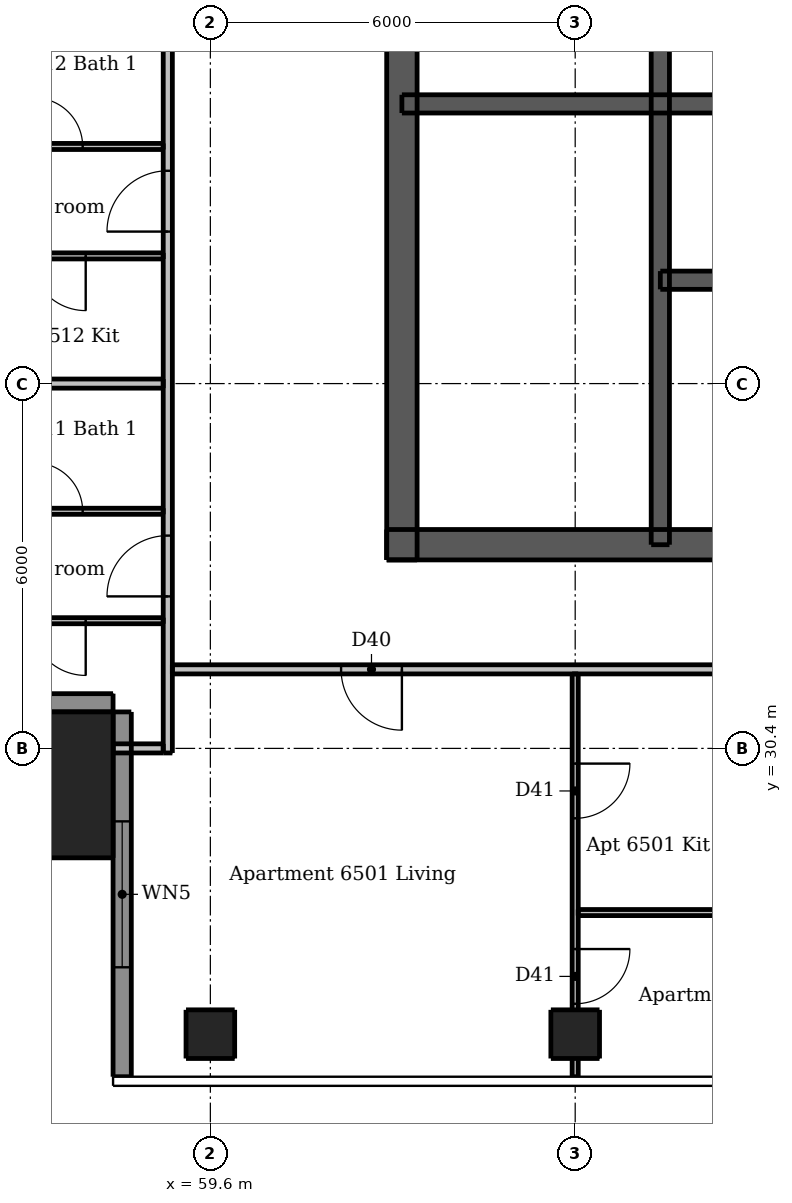
"""IFC4 building model, lengths in metres.
Left out: names, types, materials, properties, quantities, classifications, styles, units other than length and angle.
Written with IfcOpenShell. Run it as: python <this file> out.ifc"""

import sys

from ifc_helpers import new_model, si_unit, direction, frame, frame_2d, origin, origin_2d, place, context, subcontext, project, spatial, rectangle, extrude, element, fill, save


model = new_model("IFC4")
c1 = context("Model", 3, precision=1e-05, world=origin(), true_north=direction((0.0, 1.0)))
c2 = subcontext(c1, "Body", "Model", "MODEL_VIEW")
j1 = project(units=[si_unit("LENGTHUNIT", "METRE"), si_unit("PLANEANGLEUNIT", "RADIAN")], contexts=[c1])
p1 = place(None, origin())
s1 = spatial("IfcSite", under=j1, at=p1, CompositionType="ELEMENT")
p2 = place(p1, origin())
s2 = spatial("IfcBuilding", under=s1, at=p2, CompositionType="ELEMENT")
p3 = place(p2, frame((0.0, 0.0, 245.5)))
s3 = spatial("IfcBuildingStorey", under=s2, at=p3, CompositionType="ELEMENT", Elevation=245.5)
p4 = place(p3, frame((62.5, 33.75, 0.0), z_axis=(0.0, 0.0, 1.0), x_axis=(1.0, 0.0, 0.0)))
e1 = element("IfcWall", 1, at=p4, inside=s3, PredefinedType="SHEAR", context=c2, shape_type="SweptSolid", body=[
    extrude(rectangle(XDim=24.0, YDim=0.5, at=frame_2d((12.0, 0.0))), origin(), (0.0, 0.0, 1.0), 3.05),
])
p5 = place(p4, frame((1.875, 0.0, 0.0)))
e2 = element("IfcOpeningElement", 2, at=p5, cuts=e1, PredefinedType="OPENING", context=c2, shape_type="SweptSolid", body=[
    extrude(rectangle(XDim=1.1, YDim=2.1, at=frame_2d((0.55, 1.05))), frame((0.0, 0.26, 0.0), z_axis=(0.0, -1.0, 0.0), x_axis=(1.0, 0.0, 0.0)), (0.0, 0.0, 1.0), 0.52),
])
p6 = place(p4, frame((21.025, 0.0, 0.0)))
e3 = element("IfcOpeningElement", 3, at=p6, cuts=e1, PredefinedType="OPENING", context=c2, shape_type="SweptSolid", body=[
    extrude(rectangle(XDim=1.1, YDim=2.1, at=frame_2d((0.55, 1.05))), frame((0.0, 0.26, 0.0), z_axis=(0.0, -1.0, 0.0), x_axis=(1.0, 0.0, 0.0)), (0.0, 0.0, 1.0), 0.52),
])
p7 = place(p4, frame((8.0, 0.0, 0.0)))
e4 = element("IfcOpeningElement", 4, at=p7, cuts=e1, PredefinedType="OPENING", context=c2, shape_type="SweptSolid", body=[
    extrude(rectangle(XDim=1.1, YDim=2.1, at=frame_2d((0.55, 1.05))), frame((0.0, 0.26, 0.0), z_axis=(0.0, -1.0, 0.0), x_axis=(1.0, 0.0, 0.0)), (0.0, 0.0, 1.0), 0.52),
])
p8 = place(p4, frame((16.387, 0.0, 0.0)))
e5 = element("IfcOpeningElement", 5, at=p8, cuts=e1, PredefinedType="OPENING", context=c2, shape_type="SweptSolid", body=[
    extrude(rectangle(XDim=0.9, YDim=2.1, at=frame_2d((0.45, 1.05))), frame((0.0, 0.26, 0.0), z_axis=(0.0, -1.0, 0.0), x_axis=(1.0, 0.0, 0.0)), (0.0, 0.0, 1.0), 0.52),
])
p9 = place(p3, frame((62.75, 33.5, 0.0), z_axis=(0.0, 0.0, 1.0), x_axis=(0.0, 1.0, 0.0)))
e6 = element("IfcWall", 6, at=p9, inside=s3, PredefinedType="SHEAR", context=c2, shape_type="SweptSolid", body=[
    extrude(rectangle(XDim=24.0, YDim=0.5, at=frame_2d((12.0, 0.0))), origin(), (0.0, 0.0, 1.0), 3.05),
])
p10 = place(p9, frame((11.2, 0.0, 0.0)))
e7 = element("IfcOpeningElement", 7, at=p10, cuts=e6, PredefinedType="OPENING", context=c2, shape_type="SweptSolid", body=[
    extrude(rectangle(XDim=1.6, YDim=2.1, at=frame_2d((0.8, 1.05))), frame((0.0, 0.26, 0.0), z_axis=(0.0, -1.0, 0.0), x_axis=(1.0, 0.0, 0.0)), (0.0, 0.0, 1.0), 0.52),
])
p11 = place(p3, frame((62.75, 41.0, 0.0), z_axis=(0.0, 0.0, 1.0), x_axis=(1.0, 0.0, 0.0)))
e8 = element("IfcWall", 8, at=p11, inside=s3, PredefinedType="SHEAR", context=c2, shape_type="SweptSolid", body=[
    extrude(rectangle(XDim=23.5, YDim=0.3, at=frame_2d((11.75, 0.0))), origin(), (0.0, 0.0, 1.0), 3.05),
])
p12 = place(p3, frame((67.0, 33.75, 0.0), z_axis=(0.0, 0.0, 1.0), x_axis=(0.0, 1.0, 0.0)))
e9 = element("IfcWall", 9, at=p12, inside=s3, PredefinedType="SHEAR", context=c2, shape_type="SweptSolid", body=[
    extrude(rectangle(XDim=10.15, YDim=0.3, at=frame_2d((5.075, 0.0))), origin(), (0.0, 0.0, 1.0), 3.05),
])
p13 = place(p12, frame((0.45, 0.0, 0.0)))
e10 = element("IfcOpeningElement", 10, at=p13, cuts=e9, PredefinedType="OPENING", context=c2, shape_type="SweptSolid", body=[
    extrude(rectangle(XDim=1.1, YDim=2.1, at=frame_2d((0.55, 1.05))), frame((0.0, 0.16, 0.0), z_axis=(0.0, -1.0, 0.0), x_axis=(1.0, 0.0, 0.0)), (0.0, 0.0, 1.0), 0.32),
])
p14 = place(p3, frame((67.0, 38.1, 0.0), z_axis=(0.0, 0.0, 1.0), x_axis=(1.0, 0.0, 0.0)))
e11 = element("IfcWall", 11, at=p14, inside=s3, PredefinedType="SHEAR", context=c2, shape_type="SweptSolid", body=[
    extrude(rectangle(XDim=7.5, YDim=0.3, at=frame_2d((3.75, 0.0))), origin(), (0.0, 0.0, 1.0), 3.05),
])
p15 = place(p14, frame((0.7, 0.0, 0.0)))
e12 = element("IfcOpeningElement", 12, at=p15, cuts=e11, PredefinedType="OPENING", context=c2, shape_type="SweptSolid", body=[
    extrude(rectangle(XDim=1.1, YDim=2.1, at=frame_2d((0.55, 1.05))), frame((0.0, 0.16, 0.0), z_axis=(0.0, -1.0, 0.0), x_axis=(1.0, 0.0, 0.0)), (0.0, 0.0, 1.0), 0.32),
])
p16 = place(p14, frame((3.2, 0.0, 0.0)))
e13 = element("IfcOpeningElement", 13, at=p16, cuts=e11, PredefinedType="OPENING", context=c2, shape_type="SweptSolid", body=[
    extrude(rectangle(XDim=1.1, YDim=2.1, at=frame_2d((0.55, 1.05))), frame((0.0, 0.16, 0.0), z_axis=(0.0, -1.0, 0.0), x_axis=(1.0, 0.0, 0.0)), (0.0, 0.0, 1.0), 0.32),
])
p17 = place(p14, frame((5.65, 0.0, 0.0)))
e14 = element("IfcOpeningElement", 14, at=p17, cuts=e11, PredefinedType="OPENING", context=c2, shape_type="SweptSolid", body=[
    extrude(rectangle(XDim=1.2, YDim=2.1, at=frame_2d((0.6, 1.05))), frame((0.0, 0.16, 0.0), z_axis=(0.0, -1.0, 0.0), x_axis=(1.0, 0.0, 0.0)), (0.0, 0.0, 1.0), 0.32),
])
for number, where, z_axis, x_axis in (
    (15, (59.6, 25.7, 0.0), (0.0, 0.0, 1.0), (1.0, 0.0, 0.0)),
    (16, (65.6, 25.7, 0.0), (0.0, 0.0, 1.0), (1.0, 0.0, 0.0)),
):
    element("IfcColumn", number, at=place(p3, frame(where, z_axis=z_axis, x_axis=x_axis)), inside=s3, PredefinedType="COLUMN", context=c2, shape_type="SweptSolid", body=[
        extrude(rectangle(XDim=0.8, YDim=0.8, at=origin_2d()), origin(), (0.0, 0.0, 1.0), 3.05),
    ])
p18 = place(p3, frame((56.8, 29.8, 0.0), z_axis=(0.0, 0.0, 1.0), x_axis=(1.0, 0.0, 0.0)))
e17 = element("IfcColumn", 17, at=p18, inside=s3, PredefinedType="COLUMN", context=c2, shape_type="SweptSolid", body=[
    extrude(rectangle(XDim=2.4, YDim=2.4, at=origin_2d()), origin(), (0.0, 0.0, 1.0), 3.3),
])
p19 = place(p3, frame((53.0, 31.15, 0.0), z_axis=(0.0, 0.0, 1.0), x_axis=(1.0, 0.0, 0.0)))
e18 = element("IfcWall", 18, at=p19, inside=s3, PredefinedType="SOLIDWALL", context=c2, shape_type="SweptSolid", body=[
    extrude(rectangle(XDim=5.0, YDim=0.3, at=frame_2d((2.5, 0.0))), origin(), (0.0, 0.0, 1.0), 3.05),
])
p20 = place(p3, frame((58.15, 31.0, 0.0), z_axis=(0.0, 0.0, 1.0), x_axis=(0.0, -1.0, 0.0)))
e19 = element("IfcWall", 19, at=p20, inside=s3, PredefinedType="SOLIDWALL", context=c2, shape_type="SweptSolid", body=[
    extrude(rectangle(XDim=6.0, YDim=0.3, at=frame_2d((3.0, 0.0))), origin(), (0.0, 0.0, 1.0), 3.05),
])
p21 = place(p20, frame((1.8, 0.0, 0.15)))
e20 = element("IfcOpeningElement", 20, at=p21, cuts=e19, PredefinedType="OPENING", context=c2, shape_type="SweptSolid", body=[
    extrude(rectangle(XDim=2.4, YDim=2.1, at=frame_2d((1.2, 1.05))), frame((0.0, 0.16, 0.0), z_axis=(0.0, -1.0, 0.0), x_axis=(1.0, 0.0, 0.0)), (0.0, 0.0, 1.0), 0.32),
])
p22 = place(p3, frame((65.6, 31.625, 0.0), z_axis=(0.0, 0.0, 1.0), x_axis=(0.0, -1.0, 0.0)))
e21 = element("IfcWall", 21, at=p22, inside=s3, PredefinedType="PARTITIONING", context=c2, shape_type="SweptSolid", body=[
    extrude(rectangle(XDim=6.625, YDim=0.1, at=frame_2d((3.312, 0.0))), origin(), (0.0, 0.0, 1.0), 2.59),
])
p23 = place(p22, frame((1.475, 0.0, 0.0)))
e22 = element("IfcOpeningElement", 22, at=p23, cuts=e21, PredefinedType="OPENING", context=c2, shape_type="SweptSolid", body=[
    extrude(rectangle(XDim=0.9, YDim=2.1, at=frame_2d((0.45, 1.05))), frame((0.0, 0.06, 0.0), z_axis=(0.0, -1.0, 0.0), x_axis=(1.0, 0.0, 0.0)), (0.0, 0.0, 1.0), 0.12),
])
p24 = place(p22, frame((4.525, 0.0, 0.0)))
e23 = element("IfcOpeningElement", 23, at=p24, cuts=e21, PredefinedType="OPENING", context=c2, shape_type="SweptSolid", body=[
    extrude(rectangle(XDim=0.9, YDim=2.1, at=frame_2d((0.45, 1.05))), frame((0.0, 0.06, 0.0), z_axis=(0.0, -1.0, 0.0), x_axis=(1.0, 0.0, 0.0)), (0.0, 0.0, 1.0), 0.12),
])
p25 = place(p3, frame((55.35, 40.3, 0.0), z_axis=(0.0, 0.0, 1.0), x_axis=(1.0, 0.0, 0.0)))
e24 = element("IfcWall", 24, at=p25, inside=s3, PredefinedType="PARTITIONING", context=c2, shape_type="SweptSolid", body=[
    extrude(rectangle(XDim=3.475, YDim=0.1, at=frame_2d((1.737, 0.0))), origin(), (0.0, 0.0, 1.0), 3.05),
])
p26 = place(p25, frame((1.35, 0.0, 0.0)))
e25 = element("IfcOpeningElement", 25, at=p26, cuts=e24, PredefinedType="OPENING", context=c2, shape_type="SweptSolid", body=[
    extrude(rectangle(XDim=0.8, YDim=2.1, at=frame_2d((0.4, 1.05))), frame((0.0, 0.06, 0.0), z_axis=(0.0, -1.0, 0.0), x_axis=(1.0, 0.0, 0.0)), (0.0, 0.0, 1.0), 0.12),
])
p27 = place(p3, frame((58.825, 38.5, 0.0), z_axis=(0.0, 0.0, 1.0), x_axis=(-1.0, 0.0, 0.0)))
e26 = element("IfcWall", 26, at=p27, inside=s3, PredefinedType="PARTITIONING", context=c2, shape_type="SweptSolid", body=[
    extrude(rectangle(XDim=3.475, YDim=0.1, at=frame_2d((1.737, 0.0))), origin(), (0.0, 0.0, 1.0), 3.05),
])
p28 = place(p27, frame((1.275, 0.0, 0.0)))
e27 = element("IfcOpeningElement", 27, at=p28, cuts=e26, PredefinedType="OPENING", context=c2, shape_type="SweptSolid", body=[
    extrude(rectangle(XDim=0.9, YDim=2.1, at=frame_2d((0.45, 1.05))), frame((0.0, 0.06, 0.0), z_axis=(0.0, -1.0, 0.0), x_axis=(1.0, 0.0, 0.0)), (0.0, 0.0, 1.0), 0.12),
])
p29 = place(p3, frame((55.35, 34.3, 0.0), z_axis=(0.0, 0.0, 1.0), x_axis=(1.0, 0.0, 0.0)))
e28 = element("IfcWall", 28, at=p29, inside=s3, PredefinedType="PARTITIONING", context=c2, shape_type="SweptSolid", body=[
    extrude(rectangle(XDim=3.475, YDim=0.1, at=frame_2d((1.737, 0.0))), origin(), (0.0, 0.0, 1.0), 3.05),
])
p30 = place(p29, frame((1.35, 0.0, 0.0)))
e29 = element("IfcOpeningElement", 29, at=p30, cuts=e28, PredefinedType="OPENING", context=c2, shape_type="SweptSolid", body=[
    extrude(rectangle(XDim=0.8, YDim=2.1, at=frame_2d((0.4, 1.05))), frame((0.0, 0.06, 0.0), z_axis=(0.0, -1.0, 0.0), x_axis=(1.0, 0.0, 0.0)), (0.0, 0.0, 1.0), 0.12),
])
p31 = place(p3, frame((58.825, 32.5, 0.0), z_axis=(0.0, 0.0, 1.0), x_axis=(-1.0, 0.0, 0.0)))
e30 = element("IfcWall", 30, at=p31, inside=s3, PredefinedType="PARTITIONING", context=c2, shape_type="SweptSolid", body=[
    extrude(rectangle(XDim=3.475, YDim=0.1, at=frame_2d((1.737, 0.0))), origin(), (0.0, 0.0, 1.0), 3.05),
])
p32 = place(p31, frame((1.275, 0.0, 0.0)))
e31 = element("IfcOpeningElement", 31, at=p32, cuts=e30, PredefinedType="OPENING", context=c2, shape_type="SweptSolid", body=[
    extrude(rectangle(XDim=0.9, YDim=2.1, at=frame_2d((0.45, 1.05))), frame((0.0, 0.06, 0.0), z_axis=(0.0, -1.0, 0.0), x_axis=(1.0, 0.0, 0.0)), (0.0, 0.0, 1.0), 0.12),
])
p33 = place(p3, frame((65.65, 27.7, 0.0), z_axis=(0.0, 0.0, 1.0), x_axis=(1.0, 0.0, 0.0)))
e32 = element("IfcWall", 32, at=p33, inside=s3, PredefinedType="PARTITIONING", context=c2, shape_type="SweptSolid", body=[
    extrude(rectangle(XDim=5.875, YDim=0.1, at=frame_2d((2.938, 0.0))), origin(), (0.0, 0.0, 1.0), 3.05),
])
p34 = place(p33, frame((3.75, 0.0, 0.0)))
e33 = element("IfcOpeningElement", 33, at=p34, cuts=e32, PredefinedType="OPENING", context=c2, shape_type="SweptSolid", body=[
    extrude(rectangle(XDim=0.8, YDim=2.1, at=frame_2d((0.4, 1.05))), frame((0.0, 0.06, 0.0), z_axis=(0.0, -1.0, 0.0), x_axis=(1.0, 0.0, 0.0)), (0.0, 0.0, 1.0), 0.12),
])
p35 = place(p3, frame((58.9, 30.325, 0.0), z_axis=(0.0, 0.0, 1.0), x_axis=(0.0, 1.0, 0.0)))
e34 = element("IfcWall", 34, at=p35, inside=s3, PredefinedType="PARTITIONING", context=c2, shape_type="SweptSolid", body=[
    extrude(rectangle(XDim=30.85, YDim=0.15, at=frame_2d((15.425, 0.0))), origin(), (0.0, 0.0, 1.0), 3.05),
])
p36 = place(p35, frame((2.575, 0.0, 0.0)))
e35 = element("IfcOpeningElement", 35, at=p36, cuts=e34, PredefinedType="OPENING", context=c2, shape_type="SweptSolid", body=[
    extrude(rectangle(XDim=1.0, YDim=2.1, at=frame_2d((0.5, 1.05))), frame((0.0, 0.085, 0.0), z_axis=(0.0, -1.0, 0.0), x_axis=(1.0, 0.0, 0.0)), (0.0, 0.0, 1.0), 0.17),
])
p37 = place(p35, frame((8.575, 0.0, 0.0)))
e36 = element("IfcOpeningElement", 36, at=p37, cuts=e34, PredefinedType="OPENING", context=c2, shape_type="SweptSolid", body=[
    extrude(rectangle(XDim=1.0, YDim=2.1, at=frame_2d((0.5, 1.05))), frame((0.0, 0.085, 0.0), z_axis=(0.0, -1.0, 0.0), x_axis=(1.0, 0.0, 0.0)), (0.0, 0.0, 1.0), 0.17),
])
p38 = place(p35, frame((14.575, 0.0, 0.0)))
e37 = element("IfcOpeningElement", 37, at=p38, cuts=e34, PredefinedType="OPENING", context=c2, shape_type="SweptSolid", body=[
    extrude(rectangle(XDim=1.0, YDim=2.1, at=frame_2d((0.5, 1.05))), frame((0.0, 0.085, 0.0), z_axis=(0.0, -1.0, 0.0), x_axis=(1.0, 0.0, 0.0)), (0.0, 0.0, 1.0), 0.17),
])
p39 = place(p35, frame((26.925, 0.0, 0.0)))
e38 = element("IfcOpeningElement", 38, at=p39, cuts=e34, PredefinedType="OPENING", context=c2, shape_type="SweptSolid", body=[
    extrude(rectangle(XDim=1.0, YDim=2.1, at=frame_2d((0.5, 1.05))), frame((0.0, 0.085, 0.0), z_axis=(0.0, -1.0, 0.0), x_axis=(1.0, 0.0, 0.0)), (0.0, 0.0, 1.0), 0.17),
])
p40 = place(p3, frame((52.0, 36.4, 0.0), z_axis=(0.0, 0.0, 1.0), x_axis=(1.0, 0.0, 0.0)))
e39 = element("IfcWall", 39, at=p40, inside=s3, PredefinedType="PARTITIONING", context=c2, shape_type="SweptSolid", body=[
    extrude(rectangle(XDim=6.825, YDim=0.15, at=frame_2d((3.413, 0.0))), origin(), (0.0, 0.0, 1.0), 2.516),
])
p41 = place(p3, frame((89.525, 31.7, 0.0), z_axis=(0.0, 0.0, 1.0), x_axis=(-1.0, 0.0, 0.0)))
e40 = element("IfcWall", 40, at=p41, inside=s3, PredefinedType="PARTITIONING", context=c2, shape_type="SweptSolid", body=[
    extrude(rectangle(XDim=30.55, YDim=0.15, at=frame_2d((15.275, 0.0))), origin(), (0.0, 0.0, 1.0), 3.05),
])
p42 = place(p41, frame((26.775, 0.0, 0.0)))
e41 = element("IfcOpeningElement", 41, at=p42, cuts=e40, PredefinedType="OPENING", context=c2, shape_type="SweptSolid", body=[
    extrude(rectangle(XDim=1.0, YDim=2.1, at=frame_2d((0.5, 1.05))), frame((0.0, 0.085, 0.0), z_axis=(0.0, -1.0, 0.0), x_axis=(1.0, 0.0, 0.0)), (0.0, 0.0, 1.0), 0.17),
])
p43 = place(p41, frame((14.425, 0.0, 0.0)))
e42 = element("IfcOpeningElement", 42, at=p43, cuts=e40, PredefinedType="OPENING", context=c2, shape_type="SweptSolid", body=[
    extrude(rectangle(XDim=1.0, YDim=2.1, at=frame_2d((0.5, 1.05))), frame((0.0, 0.085, 0.0), z_axis=(0.0, -1.0, 0.0), x_axis=(1.0, 0.0, 0.0)), (0.0, 0.0, 1.0), 0.17),
])
p44 = place(p41, frame((6.962, 0.0, 0.0)))
e43 = element("IfcOpeningElement", 43, at=p44, cuts=e40, PredefinedType="OPENING", context=c2, shape_type="SweptSolid", body=[
    extrude(rectangle(XDim=1.0, YDim=2.1, at=frame_2d((0.5, 1.05))), frame((0.0, 0.085, 0.0), z_axis=(0.0, -1.0, 0.0), x_axis=(1.0, 0.0, 0.0)), (0.0, 0.0, 1.0), 0.17),
])
p45 = place(p3, frame((58.0, 30.4, 0.0), z_axis=(0.0, 0.0, 1.0), x_axis=(1.0, 0.0, 0.0)))
e44 = element("IfcWall", 44, at=p45, inside=s3, PredefinedType="PARTITIONING", context=c2, shape_type="SweptSolid", body=[
    extrude(rectangle(XDim=0.825, YDim=0.15, at=frame_2d((0.413, 0.0))), origin(), (0.0, 0.0, 1.0), 3.05),
])
p46 = place(p21, origin())
e45 = element("IfcWindow", 45, at=p46, inside=s3, PartitioningType="DOUBLE_PANEL_VERTICAL", PredefinedType="WINDOW", context=c2, shape_type="SweptSolid", body=[
    extrude(rectangle(XDim=2.4, YDim=2.1, at=frame_2d((1.2, 1.05))), frame((0.0, 0.03, 0.0), z_axis=(0.0, -1.0, 0.0), x_axis=(1.0, 0.0, 0.0)), (0.0, 0.0, 1.0), 0.06),
])
fill(e20, e45)
p47 = place(p5, origin())
e46 = element("IfcDoor", 46, at=p47, inside=s3, OperationType="SINGLE_SWING_LEFT", PredefinedType="DOOR", context=c2, shape_type="SweptSolid", body=[
    extrude(rectangle(XDim=1.1, YDim=2.1, at=frame_2d((0.55, 1.05))), frame((0.0, 0.237, 0.0), z_axis=(0.0, -1.0, 0.0), x_axis=(1.0, 0.0, 0.0)), (0.0, 0.0, 1.0), 0.05),
])
fill(e2, e46)
p48 = place(p13, origin())
e47 = element("IfcDoor", 47, at=p48, inside=s3, OperationType="SINGLE_SWING_RIGHT", PredefinedType="DOOR", context=c2, shape_type="SweptSolid", body=[
    extrude(rectangle(XDim=1.1, YDim=2.1, at=frame_2d((0.55, 1.05))), frame((0.0, -0.087, 0.0), z_axis=(0.0, -1.0, 0.0), x_axis=(1.0, 0.0, 0.0)), (0.0, 0.0, 1.0), 0.05),
])
fill(e10, e47)
p49 = place(p15, origin())
e48 = element("IfcDoor", 48, at=p49, inside=s3, OperationType="DOUBLE_DOOR_SLIDING", PredefinedType="DOOR", context=c2, shape_type="SweptSolid", body=[
    extrude(rectangle(XDim=1.1, YDim=2.1, at=frame_2d((0.55, 1.05))), frame((0.0, 0.025, 0.0), z_axis=(0.0, -1.0, 0.0), x_axis=(1.0, 0.0, 0.0)), (0.0, 0.0, 1.0), 0.05),
])
fill(e12, e48)
p50 = place(p42, origin())
e49 = element("IfcDoor", 49, at=p50, inside=s3, OperationType="SINGLE_SWING_LEFT", PredefinedType="DOOR", context=c2, shape_type="SweptSolid", body=[
    extrude(rectangle(XDim=1.0, YDim=2.1, at=frame_2d((0.5, 1.05))), frame((0.0, 0.025, 0.0), z_axis=(0.0, -1.0, 0.0), x_axis=(1.0, 0.0, 0.0)), (0.0, 0.0, 1.0), 0.05),
])
fill(e41, e49)
p51 = place(p23, origin())
e50 = element("IfcDoor", 50, at=p51, inside=s3, OperationType="SINGLE_SWING_LEFT", PredefinedType="DOOR", context=c2, shape_type="SweptSolid", body=[
    extrude(rectangle(XDim=0.9, YDim=2.1, at=frame_2d((0.45, 1.05))), frame((0.0, 0.025, 0.0), z_axis=(0.0, -1.0, 0.0), x_axis=(1.0, 0.0, 0.0)), (0.0, 0.0, 1.0), 0.05),
])
fill(e22, e50)
p52 = place(p24, origin())
e51 = element("IfcDoor", 51, at=p52, inside=s3, OperationType="SINGLE_SWING_LEFT", PredefinedType="DOOR", context=c2, shape_type="SweptSolid", body=[
    extrude(rectangle(XDim=0.9, YDim=2.1, at=frame_2d((0.45, 1.05))), frame((0.0, 0.025, 0.0), z_axis=(0.0, -1.0, 0.0), x_axis=(1.0, 0.0, 0.0)), (0.0, 0.0, 1.0), 0.05),
])
fill(e23, e51)
p53 = place(p36, origin())
e52 = element("IfcDoor", 52, at=p53, inside=s3, OperationType="SINGLE_SWING_LEFT", PredefinedType="DOOR", context=c2, shape_type="SweptSolid", body=[
    extrude(rectangle(XDim=1.0, YDim=2.1, at=frame_2d((0.5, 1.05))), frame((0.0, 0.025, 0.0), z_axis=(0.0, -1.0, 0.0), x_axis=(1.0, 0.0, 0.0)), (0.0, 0.0, 1.0), 0.05),
])
fill(e35, e52)
p54 = place(p32, origin())
e53 = element("IfcDoor", 53, at=p54, inside=s3, OperationType="SINGLE_SWING_LEFT", PredefinedType="DOOR", context=c2, shape_type="SweptSolid", body=[
    extrude(rectangle(XDim=0.9, YDim=2.1, at=frame_2d((0.45, 1.05))), frame((0.0, 0.025, 0.0), z_axis=(0.0, -1.0, 0.0), x_axis=(1.0, 0.0, 0.0)), (0.0, 0.0, 1.0), 0.05),
])
fill(e31, e53)
p55 = place(p30, origin())
e54 = element("IfcDoor", 54, at=p55, inside=s3, OperationType="SINGLE_SWING_LEFT", PredefinedType="DOOR", context=c2, shape_type="SweptSolid", body=[
    extrude(rectangle(XDim=0.8, YDim=2.1, at=frame_2d((0.4, 1.05))), frame((0.0, 0.025, 0.0), z_axis=(0.0, -1.0, 0.0), x_axis=(1.0, 0.0, 0.0)), (0.0, 0.0, 1.0), 0.05),
])
fill(e29, e54)
p56 = place(p37, origin())
e55 = element("IfcDoor", 55, at=p56, inside=s3, OperationType="SINGLE_SWING_LEFT", PredefinedType="DOOR", context=c2, shape_type="SweptSolid", body=[
    extrude(rectangle(XDim=1.0, YDim=2.1, at=frame_2d((0.5, 1.05))), frame((0.0, 0.025, 0.0), z_axis=(0.0, -1.0, 0.0), x_axis=(1.0, 0.0, 0.0)), (0.0, 0.0, 1.0), 0.05),
])
fill(e36, e55)
p57 = place(p28, origin())
e56 = element("IfcDoor", 56, at=p57, inside=s3, OperationType="SINGLE_SWING_LEFT", PredefinedType="DOOR", context=c2, shape_type="SweptSolid", body=[
    extrude(rectangle(XDim=0.9, YDim=2.1, at=frame_2d((0.45, 1.05))), frame((0.0, 0.025, 0.0), z_axis=(0.0, -1.0, 0.0), x_axis=(1.0, 0.0, 0.0)), (0.0, 0.0, 1.0), 0.05),
])
fill(e27, e56)
p58 = place(p26, origin())
e57 = element("IfcDoor", 57, at=p58, inside=s3, OperationType="SINGLE_SWING_LEFT", PredefinedType="DOOR", context=c2, shape_type="SweptSolid", body=[
    extrude(rectangle(XDim=0.8, YDim=2.1, at=frame_2d((0.4, 1.05))), frame((0.0, 0.025, 0.0), z_axis=(0.0, -1.0, 0.0), x_axis=(1.0, 0.0, 0.0)), (0.0, 0.0, 1.0), 0.05),
])
fill(e25, e57)
save(model, sys.argv[1])
